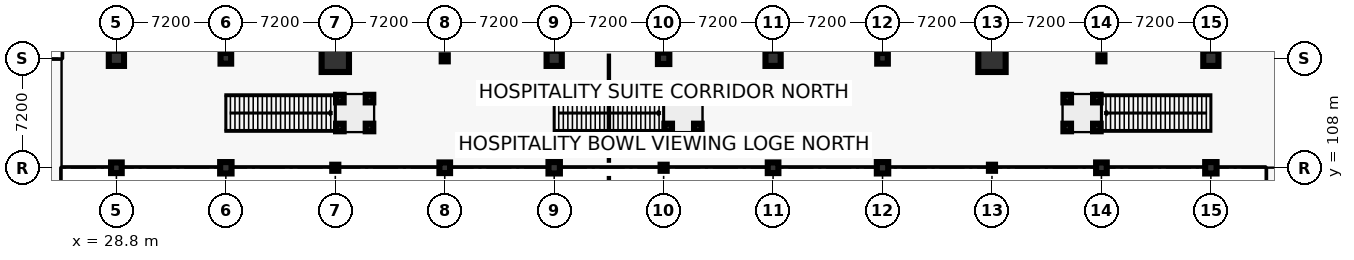
"""IFC4 building model, lengths in metres.
Left out: names, types, materials, properties, quantities, classifications, styles, units other than length and angle.
Written with IfcOpenShell. Run it as: python <this file> out.ifc"""

import sys

from ifc_helpers import new_model, si_unit, direction, frame, origin, origin_2d, place, context, subcontext, project, spatial, rectangle, hollow_rectangle, circle, extrude, element, save


model = new_model("IFC4")
c1 = context("Model", 3, precision=1e-05, world=origin(), true_north=direction((0.0, 1.0)))
c2 = subcontext(c1, "Body", "Model", "MODEL_VIEW")
j1 = project(units=[si_unit("LENGTHUNIT", "METRE"), si_unit("PLANEANGLEUNIT", "RADIAN")], contexts=[c1])
p1 = place(None, origin())
s1 = spatial("IfcSite", under=j1, at=p1, CompositionType="ELEMENT")
p2 = place(p1, origin())
s2 = spatial("IfcBuilding", under=s1, at=p2, CompositionType="ELEMENT")
p3 = place(p2, frame((0.0, 0.0, 9.6)))
s3 = spatial("IfcBuildingStorey", under=s2, at=p3, CompositionType="ELEMENT", Elevation=9.6)
p4 = place(p3, frame((28.8, 108.0, 0.0), z_axis=(0.0, 0.0, 1.0), x_axis=(1.0, 0.0, 0.0)))
e1 = element("IfcColumn", 1, at=p4, inside=s3, PredefinedType="COLUMN", context=c2, shape_type="SweptSolid", body=[
    extrude(rectangle(XDim=0.7, YDim=0.7, at=origin_2d()), origin(), (0.0, 0.0, 1.0), 4.2),
])
p5 = place(p3, frame((28.8, 115.2, 0.0), z_axis=(0.0, 0.0, 1.0), x_axis=(1.0, 0.0, 0.0)))
e2 = element("IfcColumn", 2, at=p5, inside=s3, PredefinedType="COLUMN", context=c2, shape_type="SweptSolid", body=[
    extrude(circle(Radius=0.5, at=origin_2d()), origin(), (0.0, 0.0, 1.0), 4.2),
])
p6 = place(p3, frame((36.0, 108.0, 0.0), z_axis=(0.0, 0.0, 1.0), x_axis=(1.0, 0.0, 0.0)))
e3 = element("IfcColumn", 3, at=p6, inside=s3, PredefinedType="COLUMN", context=c2, shape_type="SweptSolid", body=[
    extrude(rectangle(XDim=0.75, YDim=0.75, at=origin_2d()), origin(), (0.0, 0.0, 1.0), 4.2),
])
p7 = place(p3, frame((36.0, 115.2, 0.0), z_axis=(0.0, 0.0, 1.0), x_axis=(1.0, 0.0, 0.0)))
e4 = element("IfcColumn", 4, at=p7, inside=s3, PredefinedType="COLUMN", context=c2, shape_type="SweptSolid", body=[
    extrude(rectangle(XDim=0.7, YDim=0.7, at=origin_2d()), origin(), (0.0, 0.0, 1.0), 4.2),
])
p8 = place(p3, frame((43.2, 108.0, 0.0), z_axis=(0.0, 0.0, 1.0), x_axis=(1.0, 0.0, 0.0)))
e5 = element("IfcColumn", 5, at=p8, inside=s3, PredefinedType="COLUMN", context=c2, shape_type="SweptSolid", body=[
    extrude(hollow_rectangle(XDim=0.4, YDim=0.4, WallThickness=0.02, at=origin_2d()), origin(), (0.0, 0.0, 1.0), 4.2),
])
p9 = place(p3, frame((43.2, 115.2, 0.0), z_axis=(0.0, 0.0, 1.0), x_axis=(1.0, 0.0, 0.0)))
e6 = element("IfcColumn", 6, at=p9, inside=s3, PredefinedType="COLUMN", context=c2, shape_type="SweptSolid", body=[
    extrude(circle(Radius=0.9, at=origin_2d()), origin(), (0.0, 0.0, 1.0), 4.2),
])
p10 = place(p3, frame((50.4, 108.0, 0.0), z_axis=(0.0, 0.0, 1.0), x_axis=(1.0, 0.0, 0.0)))
e7 = element("IfcColumn", 7, at=p10, inside=s3, PredefinedType="COLUMN", context=c2, shape_type="SweptSolid", body=[
    extrude(rectangle(XDim=0.7, YDim=0.7, at=origin_2d()), origin(), (0.0, 0.0, 1.0), 4.2),
])
p11 = place(p3, frame((50.4, 115.2, 0.0), z_axis=(0.0, 0.0, 1.0), x_axis=(1.0, 0.0, 0.0)))
e8 = element("IfcColumn", 8, at=p11, inside=s3, PredefinedType="COLUMN", context=c2, shape_type="SweptSolid", body=[
    extrude(hollow_rectangle(XDim=0.4, YDim=0.4, WallThickness=0.02, at=origin_2d()), origin(), (0.0, 0.0, 1.0), 4.2),
])
p12 = place(p3, frame((57.6, 108.0, 0.0), z_axis=(0.0, 0.0, 1.0), x_axis=(1.0, 0.0, 0.0)))
e9 = element("IfcColumn", 9, at=p12, inside=s3, PredefinedType="COLUMN", context=c2, shape_type="SweptSolid", body=[
    extrude(rectangle(XDim=0.75, YDim=0.75, at=origin_2d()), origin(), (0.0, 0.0, 1.0), 4.2),
])
p13 = place(p3, frame((57.6, 115.2, 0.0), z_axis=(0.0, 0.0, 1.0), x_axis=(1.0, 0.0, 0.0)))
e10 = element("IfcColumn", 10, at=p13, inside=s3, PredefinedType="COLUMN", context=c2, shape_type="SweptSolid", body=[
    extrude(circle(Radius=0.5, at=origin_2d()), origin(), (0.0, 0.0, 1.0), 4.2),
])
p14 = place(p3, frame((64.8, 108.0, 0.0), z_axis=(0.0, 0.0, 1.0), x_axis=(1.0, 0.0, 0.0)))
e11 = element("IfcColumn", 11, at=p14, inside=s3, PredefinedType="COLUMN", context=c2, shape_type="SweptSolid", body=[
    extrude(hollow_rectangle(XDim=0.4, YDim=0.4, WallThickness=0.02, at=origin_2d()), origin(), (0.0, 0.0, 1.0), 4.2),
])
p15 = place(p3, frame((64.8, 115.2, 0.0), z_axis=(0.0, 0.0, 1.0), x_axis=(1.0, 0.0, 0.0)))
e12 = element("IfcColumn", 12, at=p15, inside=s3, PredefinedType="COLUMN", context=c2, shape_type="SweptSolid", body=[
    extrude(rectangle(XDim=0.75, YDim=0.75, at=origin_2d()), origin(), (0.0, 0.0, 1.0), 4.2),
])
p16 = place(p3, frame((72.0, 108.0, 0.0), z_axis=(0.0, 0.0, 1.0), x_axis=(1.0, 0.0, 0.0)))
e13 = element("IfcColumn", 13, at=p16, inside=s3, PredefinedType="COLUMN", context=c2, shape_type="SweptSolid", body=[
    extrude(rectangle(XDim=0.7, YDim=0.7, at=origin_2d()), origin(), (0.0, 0.0, 1.0), 4.2),
])
p17 = place(p3, frame((72.0, 115.2, 0.0), z_axis=(0.0, 0.0, 1.0), x_axis=(1.0, 0.0, 0.0)))
e14 = element("IfcColumn", 14, at=p17, inside=s3, PredefinedType="COLUMN", context=c2, shape_type="SweptSolid", body=[
    extrude(circle(Radius=0.5, at=origin_2d()), origin(), (0.0, 0.0, 1.0), 4.2),
])
p18 = place(p3, frame((79.2, 108.0, 0.0), z_axis=(0.0, 0.0, 1.0), x_axis=(1.0, 0.0, 0.0)))
e15 = element("IfcColumn", 15, at=p18, inside=s3, PredefinedType="COLUMN", context=c2, shape_type="SweptSolid", body=[
    extrude(rectangle(XDim=0.75, YDim=0.75, at=origin_2d()), origin(), (0.0, 0.0, 1.0), 4.2),
])
p19 = place(p3, frame((79.2, 115.2, 0.0), z_axis=(0.0, 0.0, 1.0), x_axis=(1.0, 0.0, 0.0)))
e16 = element("IfcColumn", 16, at=p19, inside=s3, PredefinedType="COLUMN", context=c2, shape_type="SweptSolid", body=[
    extrude(rectangle(XDim=0.7, YDim=0.7, at=origin_2d()), origin(), (0.0, 0.0, 1.0), 4.2),
])
p20 = place(p3, frame((86.4, 108.0, 0.0), z_axis=(0.0, 0.0, 1.0), x_axis=(1.0, 0.0, 0.0)))
e17 = element("IfcColumn", 17, at=p20, inside=s3, PredefinedType="COLUMN", context=c2, shape_type="SweptSolid", body=[
    extrude(hollow_rectangle(XDim=0.4, YDim=0.4, WallThickness=0.02, at=origin_2d()), origin(), (0.0, 0.0, 1.0), 4.2),
])
p21 = place(p3, frame((86.4, 115.2, 0.0), z_axis=(0.0, 0.0, 1.0), x_axis=(1.0, 0.0, 0.0)))
e18 = element("IfcColumn", 18, at=p21, inside=s3, PredefinedType="COLUMN", context=c2, shape_type="SweptSolid", body=[
    extrude(circle(Radius=0.9, at=origin_2d()), origin(), (0.0, 0.0, 1.0), 4.2),
])
p22 = place(p3, frame((93.6, 108.0, 0.0), z_axis=(0.0, 0.0, 1.0), x_axis=(1.0, 0.0, 0.0)))
e19 = element("IfcColumn", 19, at=p22, inside=s3, PredefinedType="COLUMN", context=c2, shape_type="SweptSolid", body=[
    extrude(rectangle(XDim=0.7, YDim=0.7, at=origin_2d()), origin(), (0.0, 0.0, 1.0), 4.2),
])
p23 = place(p3, frame((93.6, 115.2, 0.0), z_axis=(0.0, 0.0, 1.0), x_axis=(1.0, 0.0, 0.0)))
e20 = element("IfcColumn", 20, at=p23, inside=s3, PredefinedType="COLUMN", context=c2, shape_type="SweptSolid", body=[
    extrude(hollow_rectangle(XDim=0.4, YDim=0.4, WallThickness=0.02, at=origin_2d()), origin(), (0.0, 0.0, 1.0), 4.2),
])
p24 = place(p3, frame((100.8, 108.0, 0.0), z_axis=(0.0, 0.0, 1.0), x_axis=(1.0, 0.0, 0.0)))
e21 = element("IfcColumn", 21, at=p24, inside=s3, PredefinedType="COLUMN", context=c2, shape_type="SweptSolid", body=[
    extrude(rectangle(XDim=0.75, YDim=0.75, at=origin_2d()), origin(), (0.0, 0.0, 1.0), 4.2),
])
p25 = place(p3, frame((100.8, 115.2, 0.0), z_axis=(0.0, 0.0, 1.0), x_axis=(1.0, 0.0, 0.0)))
e22 = element("IfcColumn", 22, at=p25, inside=s3, PredefinedType="COLUMN", context=c2, shape_type="SweptSolid", body=[
    extrude(circle(Radius=0.5, at=origin_2d()), origin(), (0.0, 0.0, 1.0), 4.2),
])
for number, where, z_axis, x_axis in (
    (23, (43.5, 110.65, 0.0), (0.0, 0.0, 1.0), (1.0, 0.0, 0.0)),
    (24, (45.45, 110.65, 0.0), (0.0, 0.0, 1.0), (1.0, 0.0, 0.0)),
    (25, (43.5, 112.55, 0.0), (0.0, 0.0, 1.0), (1.0, 0.0, 0.0)),
    (26, (45.45, 112.55, 0.0), (0.0, 0.0, 1.0), (1.0, 0.0, 0.0)),
    (27, (65.1, 110.65, 0.0), (0.0, 0.0, 1.0), (1.0, 0.0, 0.0)),
    (28, (67.05, 110.65, 0.0), (0.0, 0.0, 1.0), (1.0, 0.0, 0.0)),
    (29, (65.1, 112.55, 0.0), (0.0, 0.0, 1.0), (1.0, 0.0, 0.0)),
    (30, (67.05, 112.55, 0.0), (0.0, 0.0, 1.0), (1.0, 0.0, 0.0)),
    (31, (91.35, 110.65, 0.0), (0.0, 0.0, 1.0), (1.0, 0.0, 0.0)),
    (32, (93.3, 110.65, 0.0), (0.0, 0.0, 1.0), (1.0, 0.0, 0.0)),
    (33, (91.35, 112.55, 0.0), (0.0, 0.0, 1.0), (1.0, 0.0, 0.0)),
    (34, (93.3, 112.55, 0.0), (0.0, 0.0, 1.0), (1.0, 0.0, 0.0)),
):
    element("IfcColumn", number, at=place(p3, frame(where, z_axis=z_axis, x_axis=x_axis)), inside=s3, PredefinedType="COLUMN", context=c2, shape_type="SweptSolid", body=[
        extrude(rectangle(XDim=0.5, YDim=0.5, at=origin_2d()), origin(), (0.0, 0.0, 1.0), 3.96),
    ])
save(model, sys.argv[1])
